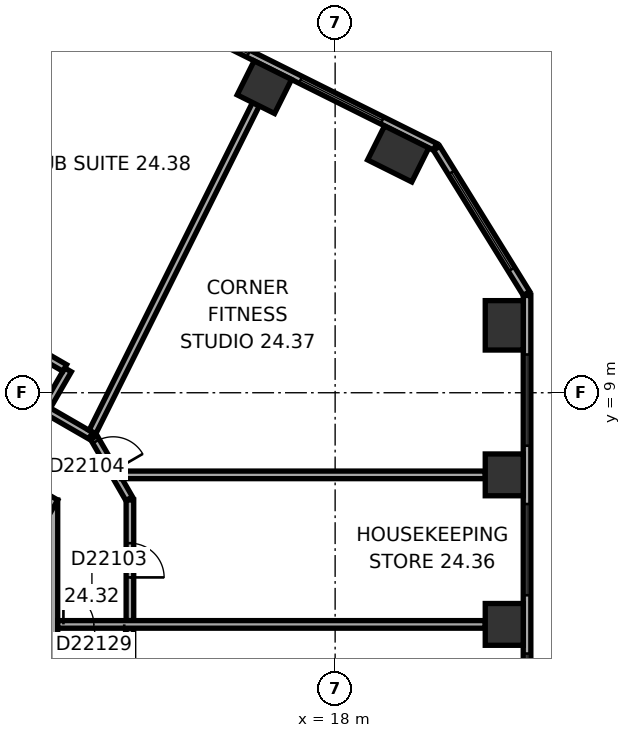
"""IFC4 building model, lengths in metres.
Left out: names, types, materials, properties, quantities, classifications, styles, units other than length and angle.
Written with IfcOpenShell. Run it as: python <this file> out.ifc"""

import sys

from ifc_helpers import new_model, si_unit, direction, frame, frame_2d, origin, origin_2d, place, context, subcontext, project, spatial, rectangle, extrude, element, fill, save


model = new_model("IFC4")
c1 = context("Model", 3, precision=1e-05, world=origin(), true_north=direction((0.0, 1.0)))
c2 = subcontext(c1, "Body", "Model", "MODEL_VIEW")
j1 = project(units=[si_unit("LENGTHUNIT", "METRE"), si_unit("PLANEANGLEUNIT", "RADIAN")], contexts=[c1])
p1 = place(None, origin())
s1 = spatial("IfcSite", under=j1, at=p1, CompositionType="ELEMENT")
p2 = place(p1, origin())
s2 = spatial("IfcBuilding", under=s1, at=p2, CompositionType="ELEMENT")
p3 = place(p2, frame((0.0, 0.0, 103.4)))
s3 = spatial("IfcBuildingStorey", under=s2, at=p3, CompositionType="ELEMENT", Elevation=103.4)
for number, where, z_axis, x_axis in (
    (1, (22.45, 2.905, 0.0), (0.0, 0.0, 1.0), (0.0, 1.0, 0.0)),
    (2, (22.45, 6.839, 0.0), (0.0, 0.0, 1.0), (0.0, 1.0, 0.0)),
):
    element("IfcColumn", number, at=place(p3, frame(where, z_axis=z_axis, x_axis=x_axis)), inside=s3, PredefinedType="COLUMN", context=c2, shape_type="SweptSolid", body=[
        extrude(rectangle(XDim=1.1, YDim=1.0, at=origin_2d()), origin(), (0.0, 0.0, 1.0), 3.3),
    ])
for number, where, z_axis, x_axis in (
    (3, (22.45, 10.774, 0.0), (0.0, 0.0, 1.0), (0.0, 1.0, 0.0)),
    (4, (19.659, 15.284, 0.0), (0.0, 0.0, 1.0), (-0.895, 0.446, 0.0)),
):
    element("IfcColumn", number, at=place(p3, frame(where, z_axis=z_axis, x_axis=x_axis)), inside=s3, PredefinedType="COLUMN", context=c2, shape_type="SweptSolid", body=[
        extrude(rectangle(XDim=1.3, YDim=1.0, at=origin_2d()), origin(), (0.0, 0.0, 1.0), 3.3),
    ])
p4 = place(p3, frame((16.138, 17.04, 0.0), z_axis=(0.0, 0.0, 1.0), x_axis=(-0.894934361602, 0.44619781311, 0.0)))
e5 = element("IfcColumn", 5, at=p4, inside=s3, PredefinedType="COLUMN", context=c2, shape_type="SweptSolid", body=[
    extrude(rectangle(XDim=1.1, YDim=1.0, at=origin_2d()), origin(), (0.0, 0.0, 1.0), 3.3),
])
p5 = place(p3, frame((10.1, -6.177, 0.0), z_axis=(0.0, 0.0, 1.0), x_axis=(0.0, 1.0, 0.0)))
e6 = element("IfcWall", 6, at=p5, inside=s3, PredefinedType="SHEAR", context=c2, shape_type="SweptSolid", body=[
    extrude(rectangle(XDim=12.355, YDim=1.2, at=frame_2d((6.177, 0.0))), origin(), (0.0, 0.0, 1.0), 3.3),
])
p6 = place(p5, frame((6.378, 0.0, 0.0)))
e7 = element("IfcOpeningElement", 7, at=p6, cuts=e6, PredefinedType="OPENING", context=c2, shape_type="SweptSolid", body=[
    extrude(rectangle(XDim=1.5, YDim=2.1, at=frame_2d((0.75, 1.05))), frame((0.0, 0.61, 0.0), z_axis=(0.0, -1.0, 0.0), x_axis=(1.0, 0.0, 0.0)), (0.0, 0.0, 1.0), 1.22),
])
p7 = place(p5, frame((1.828, 0.0, 0.0)))
e8 = element("IfcOpeningElement", 8, at=p7, cuts=e6, PredefinedType="OPENING", context=c2, shape_type="SweptSolid", body=[
    extrude(rectangle(XDim=1.1, YDim=2.1, at=frame_2d((0.55, 1.05))), frame((0.0, 0.61, 0.0), z_axis=(0.0, -1.0, 0.0), x_axis=(1.0, 0.0, 0.0)), (0.0, 0.0, 1.0), 1.22),
])
p8 = place(p5, frame((4.427, 0.0, 0.0)))
e9 = element("IfcOpeningElement", 9, at=p8, cuts=e6, PredefinedType="OPENING", context=c2, shape_type="SweptSolid", body=[
    extrude(rectangle(XDim=1.1, YDim=2.1, at=frame_2d((0.55, 1.05))), frame((0.0, 0.61, 0.0), z_axis=(0.0, -1.0, 0.0), x_axis=(1.0, 0.0, 0.0)), (0.0, 0.0, 1.0), 1.22),
])
p9 = place(p3, frame((10.4, 5.658, 0.0), z_axis=(0.0, 0.0, 1.0), x_axis=(-0.866021384402, 0.500006961711, 0.0)))
e10 = element("IfcWall", 10, at=p9, inside=s3, PredefinedType="SHEAR", context=c2, shape_type="SweptSolid", body=[
    extrude(rectangle(XDim=12.355, YDim=1.2, at=frame_2d((6.178, 0.0))), origin(), (0.0, 0.0, 1.0), 3.3),
])
p10 = place(p9, frame((2.728, 0.0, 0.0)))
e11 = element("IfcOpeningElement", 11, at=p10, cuts=e10, PredefinedType="OPENING", context=c2, shape_type="SweptSolid", body=[
    extrude(rectangle(XDim=1.1, YDim=2.1, at=frame_2d((0.55, 1.05))), frame((0.0, 0.61, 0.0), z_axis=(0.0, -1.0, 0.0), x_axis=(1.0, 0.0, 0.0)), (0.0, 0.0, 1.0), 1.22),
])
p11 = place(p9, frame((5.328, 0.0, 0.0)))
e12 = element("IfcOpeningElement", 12, at=p11, cuts=e10, PredefinedType="OPENING", context=c2, shape_type="SweptSolid", body=[
    extrude(rectangle(XDim=1.1, YDim=2.1, at=frame_2d((0.55, 1.05))), frame((0.0, 0.61, 0.0), z_axis=(0.0, -1.0, 0.0), x_axis=(1.0, 0.0, 0.0)), (0.0, 0.0, 1.0), 1.22),
])
p12 = place(p9, frame((7.928, 0.0, 0.0)))
e13 = element("IfcOpeningElement", 13, at=p12, cuts=e10, PredefinedType="OPENING", context=c2, shape_type="SweptSolid", body=[
    extrude(rectangle(XDim=1.1, YDim=2.1, at=frame_2d((0.55, 1.05))), frame((0.0, 0.61, 0.0), z_axis=(0.0, -1.0, 0.0), x_axis=(1.0, 0.0, 0.0)), (0.0, 0.0, 1.0), 1.22),
])
p13 = place(p3, frame((23.05, -9.687, 0.0), z_axis=(0.0, 0.0, 1.0), x_axis=(0.0, 1.0, 0.0)))
e14 = element("IfcWall", 14, at=p13, inside=s3, PredefinedType="STANDARD", context=c2, shape_type="SweptSolid", body=[
    extrude(rectangle(XDim=21.246, YDim=0.2, at=frame_2d((10.623, 0.0))), origin(), (0.0, 0.0, 1.0), 3.3),
])
p14 = place(p13, frame((1.555, 0.0, 0.8)))
e15 = element("IfcOpeningElement", 15, at=p14, cuts=e14, PredefinedType="OPENING", context=c2, shape_type="SweptSolid", body=[
    extrude(rectangle(XDim=2.4, YDim=1.7, at=frame_2d((1.2, 0.85))), frame((0.0, 0.11, 0.0), z_axis=(0.0, -1.0, 0.0), x_axis=(1.0, 0.0, 0.0)), (0.0, 0.0, 1.0), 0.22),
])
p15 = place(p13, frame((5.489, 0.0, 0.8)))
e16 = element("IfcOpeningElement", 16, at=p15, cuts=e14, PredefinedType="OPENING", context=c2, shape_type="SweptSolid", body=[
    extrude(rectangle(XDim=2.4, YDim=1.7, at=frame_2d((1.2, 0.85))), frame((0.0, 0.11, 0.0), z_axis=(0.0, -1.0, 0.0), x_axis=(1.0, 0.0, 0.0)), (0.0, 0.0, 1.0), 0.22),
])
p16 = place(p13, frame((9.424, 0.0, 0.8)))
e17 = element("IfcOpeningElement", 17, at=p16, cuts=e14, PredefinedType="OPENING", context=c2, shape_type="SweptSolid", body=[
    extrude(rectangle(XDim=2.4, YDim=1.7, at=frame_2d((1.2, 0.85))), frame((0.0, 0.11, 0.0), z_axis=(0.0, -1.0, 0.0), x_axis=(1.0, 0.0, 0.0)), (0.0, 0.0, 1.0), 0.22),
])
p17 = place(p13, frame((13.358, 0.0, 0.8)))
e18 = element("IfcOpeningElement", 18, at=p17, cuts=e14, PredefinedType="OPENING", context=c2, shape_type="SweptSolid", body=[
    extrude(rectangle(XDim=2.4, YDim=1.7, at=frame_2d((1.2, 0.85))), frame((0.0, 0.11, 0.0), z_axis=(0.0, -1.0, 0.0), x_axis=(1.0, 0.0, 0.0)), (0.0, 0.0, 1.0), 0.22),
])
p18 = place(p13, frame((17.293, 0.0, 0.8)))
e19 = element("IfcOpeningElement", 19, at=p18, cuts=e14, PredefinedType="OPENING", context=c2, shape_type="SweptSolid", body=[
    extrude(rectangle(XDim=2.4, YDim=1.7, at=frame_2d((1.2, 0.85))), frame((0.0, 0.11, 0.0), z_axis=(0.0, -1.0, 0.0), x_axis=(1.0, 0.0, 0.0)), (0.0, 0.0, 1.0), 0.22),
])
p19 = place(p3, frame((23.035, 11.612, 0.0), z_axis=(0.0, 0.0, 1.0), x_axis=(-0.526160091227, 0.850385535155, 0.0)))
e20 = element("IfcWall", 20, at=p19, inside=s3, PredefinedType="STANDARD", context=c2, shape_type="SweptSolid", body=[
    extrude(rectangle(XDim=4.494, YDim=0.2, at=frame_2d((2.247, 0.0))), origin(), (0.0, 0.0, 1.0), 3.3),
])
p20 = place(p19, frame((0.747, 0.0, 0.8)))
e21 = element("IfcOpeningElement", 21, at=p20, cuts=e20, PredefinedType="OPENING", context=c2, shape_type="SweptSolid", body=[
    extrude(rectangle(XDim=3.0, YDim=1.7, at=frame_2d((1.5, 0.85))), frame((0.0, 0.11, 0.0), z_axis=(0.0, -1.0, 0.0), x_axis=(1.0, 0.0, 0.0)), (0.0, 0.0, 1.0), 0.22),
])
p21 = place(p3, frame((20.63, 15.47, 0.0), z_axis=(0.0, 0.0, 1.0), x_axis=(-0.894934518609, 0.446197498203, 0.0)))
e22 = element("IfcWall", 22, at=p21, inside=s3, PredefinedType="STANDARD", context=c2, shape_type="SweptSolid", body=[
    extrude(rectangle(XDim=21.246, YDim=0.2, at=frame_2d((10.623, 0.0))), origin(), (0.0, 0.0, 1.0), 3.3),
])
p22 = place(p21, frame((1.553, 0.0, 0.8)))
e23 = element("IfcOpeningElement", 23, at=p22, cuts=e22, PredefinedType="OPENING", context=c2, shape_type="SweptSolid", body=[
    extrude(rectangle(XDim=2.4, YDim=1.7, at=frame_2d((1.2, 0.85))), frame((0.0, 0.11, 0.0), z_axis=(0.0, -1.0, 0.0), x_axis=(1.0, 0.0, 0.0)), (0.0, 0.0, 1.0), 0.22),
])
p23 = place(p21, frame((5.488, 0.0, 0.8)))
e24 = element("IfcOpeningElement", 24, at=p23, cuts=e22, PredefinedType="OPENING", context=c2, shape_type="SweptSolid", body=[
    extrude(rectangle(XDim=2.4, YDim=1.7, at=frame_2d((1.2, 0.85))), frame((0.0, 0.11, 0.0), z_axis=(0.0, -1.0, 0.0), x_axis=(1.0, 0.0, 0.0)), (0.0, 0.0, 1.0), 0.22),
])
p24 = place(p21, frame((9.422, 0.0, 0.8)))
e25 = element("IfcOpeningElement", 25, at=p24, cuts=e22, PredefinedType="OPENING", context=c2, shape_type="SweptSolid", body=[
    extrude(rectangle(XDim=2.4, YDim=1.7, at=frame_2d((1.2, 0.85))), frame((0.0, 0.11, 0.0), z_axis=(0.0, -1.0, 0.0), x_axis=(1.0, 0.0, 0.0)), (0.0, 0.0, 1.0), 0.22),
])
p25 = place(p21, frame((13.357, 0.0, 0.8)))
e26 = element("IfcOpeningElement", 26, at=p25, cuts=e22, PredefinedType="OPENING", context=c2, shape_type="SweptSolid", body=[
    extrude(rectangle(XDim=2.4, YDim=1.7, at=frame_2d((1.2, 0.85))), frame((0.0, 0.11, 0.0), z_axis=(0.0, -1.0, 0.0), x_axis=(1.0, 0.0, 0.0)), (0.0, 0.0, 1.0), 0.22),
])
p26 = place(p21, frame((17.292, 0.0, 0.8)))
e27 = element("IfcOpeningElement", 27, at=p26, cuts=e22, PredefinedType="OPENING", context=c2, shape_type="SweptSolid", body=[
    extrude(rectangle(XDim=2.4, YDim=1.7, at=frame_2d((1.2, 0.85))), frame((0.0, 0.11, 0.0), z_axis=(0.0, -1.0, 0.0), x_axis=(1.0, 0.0, 0.0)), (0.0, 0.0, 1.0), 0.22),
])
p27 = place(p3, frame((10.371, 8.561, 0.0), z_axis=(0.0, 0.0, 1.0), x_axis=(0.499986357472, 0.866033280158, 0.0)))
e28 = element("IfcWall", 28, at=p27, inside=s3, PredefinedType="PARTITIONING", context=c2, shape_type="SweptSolid", body=[
    extrude(rectangle(XDim=1.201, YDim=0.2, at=frame_2d((0.601, 0.0))), origin(), (0.0, 0.0, 1.0), 3.05),
])
p28 = place(p3, frame((10.885, 9.652, 0.0), z_axis=(0.0, 0.0, 1.0), x_axis=(-0.866033630405, 0.499985750804, 0.0)))
e29 = element("IfcWall", 29, at=p28, inside=s3, PredefinedType="PARTITIONING", context=c2, shape_type="SweptSolid", body=[
    extrude(rectangle(XDim=8.642, YDim=0.2, at=frame_2d((4.321, 0.0))), origin(), (0.0, 0.0, 1.0), 3.05),
])
p29 = place(p28, frame((2.276, 0.0, 0.0)))
e30 = element("IfcOpeningElement", 30, at=p29, cuts=e29, PredefinedType="OPENING", context=c2, shape_type="SweptSolid", body=[
    extrude(rectangle(XDim=0.9, YDim=2.1, at=frame_2d((0.45, 1.05))), frame((0.0, 0.11, 0.0), z_axis=(0.0, -1.0, 0.0), x_axis=(1.0, 0.0, 0.0)), (0.0, 0.0, 1.0), 0.22),
])
p30 = place(p3, frame((11.566, 7.871, 0.0), z_axis=(0.0, 0.0, 1.0), x_axis=(-0.866004557827, 0.500036104519, 0.0)))
e31 = element("IfcWall", 31, at=p30, inside=s3, PredefinedType="PARTITIONING", context=c2, shape_type="SweptSolid", body=[
    extrude(rectangle(XDim=1.28, YDim=0.2, at=frame_2d((0.64, 0.0))), origin(), (0.0, 0.0, 1.0), 3.05),
])
p31 = place(p3, frame((12.58, 6.212, 0.0), z_axis=(0.0, 0.0, 1.0), x_axis=(-0.500063286585, 0.865988862174, 0.0)))
e32 = element("IfcWall", 32, at=p31, inside=s3, PredefinedType="PARTITIONING", context=c2, shape_type="SweptSolid", body=[
    extrude(rectangle(XDim=1.86, YDim=0.2, at=frame_2d((0.93, 0.0))), origin(), (0.0, 0.0, 1.0), 3.05),
])
p32 = place(p31, frame((0.842, 0.0, 0.0)))
e33 = element("IfcOpeningElement", 33, at=p32, cuts=e32, PredefinedType="OPENING", context=c2, shape_type="SweptSolid", body=[
    extrude(rectangle(XDim=0.9, YDim=2.1, at=frame_2d((0.45, 1.05))), frame((0.0, 0.11, 0.0), z_axis=(0.0, -1.0, 0.0), x_axis=(1.0, 0.0, 0.0)), (0.0, 0.0, 1.0), 0.22),
])
p33 = place(p3, frame((12.6, 0.201, 0.0), z_axis=(0.0, 0.0, 1.0), x_axis=(0.0, 1.0, 0.0)))
e34 = element("IfcWall", 34, at=p33, inside=s3, PredefinedType="PARTITIONING", context=c2, shape_type="SweptSolid", body=[
    extrude(rectangle(XDim=2.604, YDim=0.2, at=frame_2d((1.302, 0.0))), origin(), (0.0, 0.0, 1.0), 3.05),
])
p34 = place(p33, frame((0.852, 0.0, 0.0)))
e35 = element("IfcOpeningElement", 35, at=p34, cuts=e34, PredefinedType="OPENING", context=c2, shape_type="SweptSolid", body=[
    extrude(rectangle(XDim=0.9, YDim=2.1, at=frame_2d((0.45, 1.05))), frame((0.0, 0.11, 0.0), z_axis=(0.0, -1.0, 0.0), x_axis=(1.0, 0.0, 0.0)), (0.0, 0.0, 1.0), 0.22),
])
p35 = place(p3, frame((12.6, 3.004, 0.0), z_axis=(0.0, 0.0, 1.0), x_axis=(0.0, 1.0, 0.0)))
e36 = element("IfcWall", 36, at=p35, inside=s3, PredefinedType="PARTITIONING", context=c2, shape_type="SweptSolid", body=[
    extrude(rectangle(XDim=3.173, YDim=0.2, at=frame_2d((1.586, 0.0))), origin(), (0.0, 0.0, 1.0), 3.05),
])
p36 = place(p35, frame((1.136, 0.0, 0.0)))
e37 = element("IfcOpeningElement", 37, at=p36, cuts=e36, PredefinedType="OPENING", context=c2, shape_type="SweptSolid", body=[
    extrude(rectangle(XDim=0.9, YDim=2.1, at=frame_2d((0.45, 1.05))), frame((0.0, 0.11, 0.0), z_axis=(0.0, -1.0, 0.0), x_axis=(1.0, 0.0, 0.0)), (0.0, 0.0, 1.0), 0.22),
])
p37 = place(p3, frame((15.915, 16.592, 0.0), z_axis=(0.0, 0.0, 1.0), x_axis=(-0.446199736347, -0.894933402709, 0.0)))
e38 = element("IfcWall", 38, at=p37, inside=s3, PredefinedType="PARTITIONING", context=c2, shape_type="SweptSolid", body=[
    extrude(rectangle(XDim=9.635, YDim=0.2, at=frame_2d((4.817, 0.0))), origin(), (0.0, 0.0, 1.0), 3.05),
])
p38 = place(p3, frame((21.95, 2.905, 0.0), z_axis=(0.0, 0.0, 1.0), x_axis=(-1.0, 0.0, 0.0)))
e39 = element("IfcWall", 39, at=p38, inside=s3, PredefinedType="PARTITIONING", context=c2, shape_type="SweptSolid", body=[
    extrude(rectangle(XDim=11.25, YDim=0.2, at=frame_2d((5.625, 0.0))), origin(), (0.0, 0.0, 1.0), 3.05),
])
p39 = place(p38, frame((9.5, 0.0, 0.0)))
e40 = element("IfcOpeningElement", 40, at=p39, cuts=e39, PredefinedType="OPENING", context=c2, shape_type="SweptSolid", body=[
    extrude(rectangle(XDim=1.6, YDim=2.1, at=frame_2d((0.8, 1.05))), frame((0.0, 0.11, 0.0), z_axis=(0.0, -1.0, 0.0), x_axis=(1.0, 0.0, 0.0)), (0.0, 0.0, 1.0), 0.22),
])
p40 = place(p3, frame((21.95, 6.839, 0.0), z_axis=(0.0, 0.0, 1.0), x_axis=(-1.0, 0.0, 0.0)))
e41 = element("IfcWall", 41, at=p40, inside=s3, PredefinedType="PARTITIONING", context=c2, shape_type="SweptSolid", body=[
    extrude(rectangle(XDim=9.572, YDim=0.2, at=frame_2d((4.786, 0.0))), origin(), (0.0, 0.0, 1.0), 3.05),
])
p41 = place(p16, origin())
e42 = element("IfcWindow", 42, at=p41, inside=s3, PartitioningType="SINGLE_PANEL", PredefinedType="WINDOW", context=c2, shape_type="SweptSolid", body=[
    extrude(rectangle(XDim=2.4, YDim=1.7, at=frame_2d((1.2, 0.85))), frame((0.0, 0.03, 0.0), z_axis=(0.0, -1.0, 0.0), x_axis=(1.0, 0.0, 0.0)), (0.0, 0.0, 1.0), 0.06),
])
fill(e17, e42)
p42 = place(p17, origin())
e43 = element("IfcWindow", 43, at=p42, inside=s3, PartitioningType="SINGLE_PANEL", PredefinedType="WINDOW", context=c2, shape_type="SweptSolid", body=[
    extrude(rectangle(XDim=2.4, YDim=1.7, at=frame_2d((1.2, 0.85))), frame((0.0, 0.03, 0.0), z_axis=(0.0, -1.0, 0.0), x_axis=(1.0, 0.0, 0.0)), (0.0, 0.0, 1.0), 0.06),
])
fill(e18, e43)
p43 = place(p18, origin())
e44 = element("IfcWindow", 44, at=p43, inside=s3, PartitioningType="SINGLE_PANEL", PredefinedType="WINDOW", context=c2, shape_type="SweptSolid", body=[
    extrude(rectangle(XDim=2.4, YDim=1.7, at=frame_2d((1.2, 0.85))), frame((0.0, 0.03, 0.0), z_axis=(0.0, -1.0, 0.0), x_axis=(1.0, 0.0, 0.0)), (0.0, 0.0, 1.0), 0.06),
])
fill(e19, e44)
p44 = place(p20, origin())
e45 = element("IfcWindow", 45, at=p44, inside=s3, PartitioningType="SINGLE_PANEL", PredefinedType="WINDOW", context=c2, shape_type="SweptSolid", body=[
    extrude(rectangle(XDim=3.0, YDim=1.7, at=frame_2d((1.5, 0.85))), frame((0.0, 0.03, 0.0), z_axis=(0.0, -1.0, 0.0), x_axis=(1.0, 0.0, 0.0)), (0.0, 0.0, 1.0), 0.06),
])
fill(e21, e45)
p45 = place(p22, origin())
e46 = element("IfcWindow", 46, at=p45, inside=s3, PartitioningType="SINGLE_PANEL", PredefinedType="WINDOW", context=c2, shape_type="SweptSolid", body=[
    extrude(rectangle(XDim=2.4, YDim=1.7, at=frame_2d((1.2, 0.85))), frame((0.0, 0.03, 0.0), z_axis=(0.0, -1.0, 0.0), x_axis=(1.0, 0.0, 0.0)), (0.0, 0.0, 1.0), 0.06),
])
fill(e23, e46)
p46 = place(p23, origin())
e47 = element("IfcWindow", 47, at=p46, inside=s3, PartitioningType="SINGLE_PANEL", PredefinedType="WINDOW", context=c2, shape_type="SweptSolid", body=[
    extrude(rectangle(XDim=2.4, YDim=1.7, at=frame_2d((1.2, 0.85))), frame((0.0, 0.03, 0.0), z_axis=(0.0, -1.0, 0.0), x_axis=(1.0, 0.0, 0.0)), (0.0, 0.0, 1.0), 0.06),
])
fill(e24, e47)
p47 = place(p36, origin())
e48 = element("IfcDoor", 48, at=p47, inside=s3, OperationType="SINGLE_SWING_LEFT", PredefinedType="DOOR", context=c2, shape_type="SweptSolid", body=[
    extrude(rectangle(XDim=0.9, YDim=2.1, at=frame_2d((0.45, 1.05))), frame((0.0, 0.025, 0.0), z_axis=(0.0, -1.0, 0.0), x_axis=(1.0, 0.0, 0.0)), (0.0, 0.0, 1.0), 0.05),
])
fill(e37, e48)
p48 = place(p32, origin())
e49 = element("IfcDoor", 49, at=p48, inside=s3, OperationType="SINGLE_SWING_LEFT", PredefinedType="DOOR", context=c2, shape_type="SweptSolid", body=[
    extrude(rectangle(XDim=0.9, YDim=2.1, at=frame_2d((0.45, 1.05))), frame((0.0, 0.025, 0.0), z_axis=(0.0, -1.0, 0.0), x_axis=(1.0, 0.0, 0.0)), (0.0, 0.0, 1.0), 0.05),
])
fill(e33, e49)
p49 = place(p39, origin())
e50 = element("IfcDoor", 50, at=p49, inside=s3, OperationType="DOUBLE_DOOR_SINGLE_SWING", PredefinedType="DOOR", context=c2, shape_type="SweptSolid", body=[
    extrude(rectangle(XDim=1.6, YDim=2.1, at=frame_2d((0.8, 1.05))), frame((0.0, 0.025, 0.0), z_axis=(0.0, -1.0, 0.0), x_axis=(1.0, 0.0, 0.0)), (0.0, 0.0, 1.0), 0.05),
])
fill(e40, e50)
save(model, sys.argv[1])
